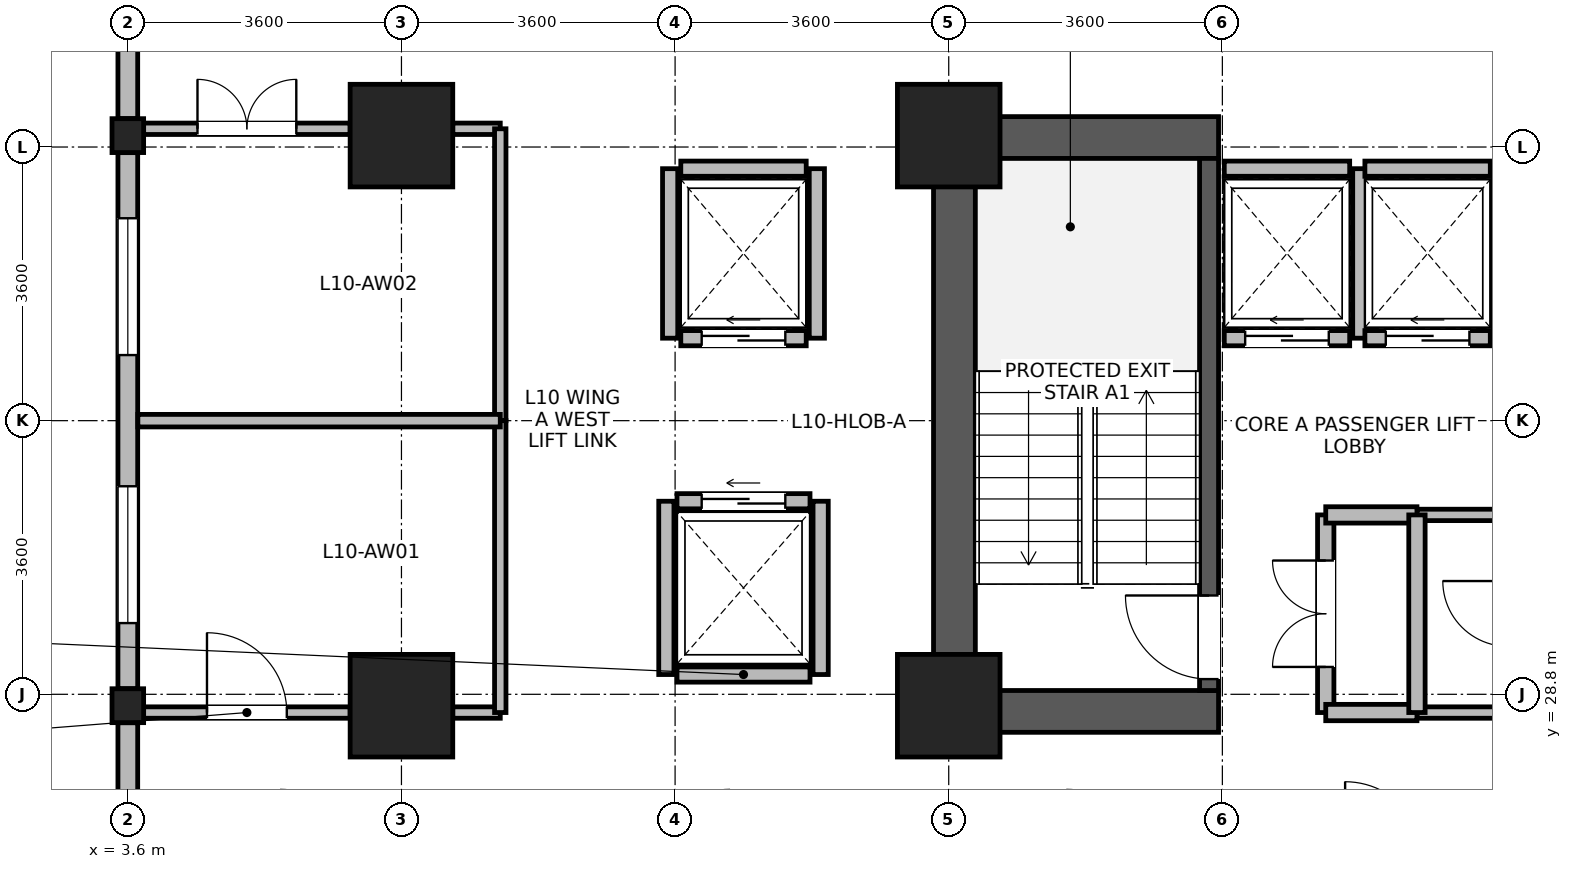
"""IFC4 building model, lengths in metres.
Left out: names, types, materials, properties, quantities, classifications, styles, units other than length and angle.
Written with IfcOpenShell. Run it as: python <this file> out.ifc"""

import sys

from ifc_helpers import new_model, si_unit, direction, frame, frame_2d, origin, origin_2d, place, context, subcontext, project, spatial, rectangle, i_section, extrude, source, transform, mapped, element, fill, save


model = new_model("IFC4")
c1 = context("Model", 3, precision=1e-05, world=origin(), true_north=direction((0.0, 1.0)))
c2 = subcontext(c1, "Body", "Model", "MODEL_VIEW")
j1 = project(units=[si_unit("LENGTHUNIT", "METRE"), si_unit("PLANEANGLEUNIT", "RADIAN")], contexts=[c1])
p1 = place(None, origin())
s1 = spatial("IfcSite", under=j1, at=p1, CompositionType="ELEMENT")
p2 = place(p1, origin())
s2 = spatial("IfcBuilding", under=s1, at=p2, CompositionType="ELEMENT")
p3 = place(p2, frame((0.0, 0.0, 43.8)))
s3 = spatial("IfcBuildingStorey", under=s2, at=p3, CompositionType="ELEMENT", Elevation=43.8)
p4 = place(p3, frame((14.475, 28.3, 0.0), z_axis=(0.0, 0.0, 1.0), x_axis=(0.0, 1.0, 0.0)))
e1 = element("IfcWall", 1, at=p4, inside=s3, PredefinedType="SHEAR", context=c2, shape_type="SweptSolid", body=[
    extrude(rectangle(XDim=8.1, YDim=0.55, at=frame_2d((4.05, 0.0))), origin(), (0.0, 0.0, 1.0), 3.45),
])
for number, where, z_axis, x_axis in (
    (2, (14.75, 28.575, 0.0), (0.0, 0.0, 1.0), (1.0, 0.0, 0.0)),
    (3, (14.75, 36.125, 0.0), (0.0, 0.0, 1.0), (1.0, 0.0, 0.0)),
):
    element("IfcWall", number, at=place(p3, frame(where, z_axis=z_axis, x_axis=x_axis)), inside=s3, PredefinedType="SHEAR", context=c2, shape_type="SweptSolid", body=[
        extrude(rectangle(XDim=3.2, YDim=0.55, at=frame_2d((1.6, 0.0))), origin(), (0.0, 0.0, 1.0), 3.45),
    ])
p5 = place(p3, frame((17.825, 28.85, 0.0), z_axis=(0.0, 0.0, 1.0), x_axis=(0.0, 1.0, 0.0)))
e4 = element("IfcWall", 4, at=p5, inside=s3, PredefinedType="SHEAR", context=c2, shape_type="SweptSolid", body=[
    extrude(rectangle(XDim=7.0, YDim=0.25, at=frame_2d((3.5, 0.0))), origin(), (0.0, 0.0, 1.0), 3.45),
])
p6 = place(p5, frame((0.15, 0.0, 0.0)))
e5 = element("IfcOpeningElement", 5, at=p6, cuts=e4, PredefinedType="OPENING", context=c2, shape_type="SweptSolid", body=[
    extrude(rectangle(XDim=1.1, YDim=2.08, at=frame_2d((0.55, 1.04))), frame((0.0, 0.135, 0.0), z_axis=(0.0, -1.0, 0.0), x_axis=(1.0, 0.0, 0.0)), (0.0, 0.0, 1.0), 0.27),
])
m1 = source(origin(), c2, "Body", "SweptSolid", [
    extrude(rectangle(XDim=1.35, YDim=1.35, at=origin_2d()), origin(), (0.0, 0.0, 1.0), 3.7),
])
for number, where, z_axis, x_axis in (
    (6, (7.2, 28.65, 0.0), (0.0, 0.0, 1.0), (1.0, 0.0, 0.0)),
    (7, (7.2, 36.15, 0.0), (0.0, 0.0, 1.0), (1.0, 0.0, 0.0)),
    (8, (14.4, 28.65, 0.0), (0.0, 0.0, 1.0), (1.0, 0.0, 0.0)),
    (9, (14.4, 36.15, 0.0), (0.0, 0.0, 1.0), (1.0, 0.0, 0.0)),
):
    element("IfcColumn", number, at=place(p3, frame(where, z_axis=z_axis, x_axis=x_axis)), inside=s3, PredefinedType="COLUMN", context=c2, shape_type="MappedRepresentation", body=[
        mapped(m1, transform((0.0, 0.0, 0.0), x_axis=(1.0, 0.0, 0.0), y_axis=(0.0, 1.0, 0.0), z_axis=(0.0, 0.0, 1.0), scale=1.0)),
    ])
m2 = source(origin(), c2, "Body", "SweptSolid", [
    extrude(i_section(OverallWidth=0.416, OverallDepth=0.446, WebThickness=0.029, FlangeThickness=0.04, FilletRadius=0.015, at=origin_2d()), origin(), (0.0, 0.0, 1.0), 3.7),
])
for number, where, z_axis, x_axis in (
    (10, (3.6, 28.65, 0.0), (0.0, 0.0, 1.0), (1.0, 0.0, 0.0)),
    (11, (3.6, 36.15, 0.0), (0.0, 0.0, 1.0), (1.0, 0.0, 0.0)),
):
    element("IfcColumn", number, at=place(p3, frame(where, z_axis=z_axis, x_axis=x_axis)), inside=s3, PredefinedType="COLUMN", context=c2, shape_type="MappedRepresentation", body=[
        mapped(m2, transform((0.0, 0.0, 0.0), x_axis=(1.0, 0.0, 0.0), y_axis=(0.0, 1.0, 0.0), z_axis=(0.0, 0.0, 1.0), scale=1.0)),
    ])
p7 = place(p3, frame((3.6, 36.374, 0.0), z_axis=(0.0, 0.0, 1.0), x_axis=(0.0, 1.0, 0.0)))
e12 = element("IfcWall", 12, at=p7, inside=s3, PredefinedType="STANDARD", context=c2, shape_type="SweptSolid", body=[
    extrude(rectangle(XDim=6.956, YDim=0.26, at=frame_2d((3.478, 0.0))), origin(), (0.0, 0.0, 1.0), 3.43),
])
p8 = place(p7, frame((4.317, 0.0, 0.85)))
e13 = element("IfcOpeningElement", 13, at=p8, cuts=e12, PredefinedType="OPENING", context=c2, shape_type="SweptSolid", body=[
    extrude(rectangle(XDim=1.8, YDim=1.85, at=frame_2d((0.9, 0.925))), frame((0.0, 0.14, 0.0), z_axis=(0.0, -1.0, 0.0), x_axis=(1.0, 0.0, 0.0)), (0.0, 0.0, 1.0), 0.28),
])
p9 = place(p7, frame((3.003, 0.0, 0.85)))
e14 = element("IfcOpeningElement", 14, at=p9, cuts=e12, PredefinedType="OPENING", context=c2, shape_type="SweptSolid", body=[
    extrude(rectangle(XDim=0.95, YDim=1.75, at=frame_2d((0.475, 0.875))), frame((0.0, 0.14, 0.0), z_axis=(0.0, -1.0, 0.0), x_axis=(1.0, 0.0, 0.0)), (0.0, 0.0, 1.0), 0.28),
])
p10 = place(p3, frame((3.6, 28.874, 0.0), z_axis=(0.0, 0.0, 1.0), x_axis=(0.0, 1.0, 0.0)))
e15 = element("IfcWall", 15, at=p10, inside=s3, PredefinedType="STANDARD", context=c2, shape_type="SweptSolid", body=[
    extrude(rectangle(XDim=7.052, YDim=0.26, at=frame_2d((3.526, 0.0))), origin(), (0.0, 0.0, 1.0), 2.93),
])
p11 = place(p10, frame((0.863, 0.0, 0.85)))
e16 = element("IfcOpeningElement", 16, at=p11, cuts=e15, PredefinedType="OPENING", context=c2, shape_type="SweptSolid", body=[
    extrude(rectangle(XDim=1.8, YDim=1.85, at=frame_2d((0.9, 0.925))), frame((0.0, 0.14, 0.0), z_axis=(0.0, -1.0, 0.0), x_axis=(1.0, 0.0, 0.0)), (0.0, 0.0, 1.0), 0.28),
])
p12 = place(p10, frame((4.389, 0.0, 0.85)))
e17 = element("IfcOpeningElement", 17, at=p12, cuts=e15, PredefinedType="OPENING", context=c2, shape_type="SweptSolid", body=[
    extrude(rectangle(XDim=1.8, YDim=1.85, at=frame_2d((0.9, 0.925))), frame((0.0, 0.14, 0.0), z_axis=(0.0, -1.0, 0.0), x_axis=(1.0, 0.0, 0.0)), (0.0, 0.0, 1.0), 0.28),
])
p13 = place(p3, frame((3.6, 21.47, 0.0), z_axis=(0.0, 0.0, 1.0), x_axis=(0.0, 1.0, 0.0)))
e18 = element("IfcWall", 18, at=p13, inside=s3, PredefinedType="STANDARD", context=c2, shape_type="SweptSolid", body=[
    extrude(rectangle(XDim=6.956, YDim=0.26, at=frame_2d((3.478, 0.0))), origin(), (0.0, 0.0, 1.0), 3.43),
])
p14 = place(p13, frame((0.839, 0.0, 0.85)))
e19 = element("IfcOpeningElement", 19, at=p14, cuts=e18, PredefinedType="OPENING", context=c2, shape_type="SweptSolid", body=[
    extrude(rectangle(XDim=1.8, YDim=1.85, at=frame_2d((0.9, 0.925))), frame((0.0, 0.14, 0.0), z_axis=(0.0, -1.0, 0.0), x_axis=(1.0, 0.0, 0.0)), (0.0, 0.0, 1.0), 0.28),
])
p15 = place(p13, frame((3.003, 0.0, 0.85)))
e20 = element("IfcOpeningElement", 20, at=p15, cuts=e18, PredefinedType="OPENING", context=c2, shape_type="SweptSolid", body=[
    extrude(rectangle(XDim=0.95, YDim=1.75, at=frame_2d((0.475, 0.875))), frame((0.0, 0.14, 0.0), z_axis=(0.0, -1.0, 0.0), x_axis=(1.0, 0.0, 0.0)), (0.0, 0.0, 1.0), 0.28),
])
p16 = place(p3, frame((18.025, 33.485, 0.0), z_axis=(0.0, 0.0, 1.0), x_axis=(1.0, 0.0, 0.0)))
e21 = element("IfcWall", 21, at=p16, inside=s3, PredefinedType="PARTITIONING", context=c2, shape_type="SweptSolid", body=[
    extrude(rectangle(XDim=1.65, YDim=0.2, at=frame_2d((0.825, 0.0))), origin(), (0.0, 0.0, 1.0), 3.43),
])
p17 = place(p16, frame((0.275, 0.0, 0.0)))
e22 = element("IfcOpeningElement", 22, at=p17, cuts=e21, PredefinedType="OPENING", context=c2, shape_type="SweptSolid", body=[
    extrude(rectangle(XDim=1.1, YDim=2.12, at=frame_2d((0.55, 1.06))), frame((0.0, 0.11, 0.0), z_axis=(0.0, -1.0, 0.0), x_axis=(1.0, 0.0, 0.0)), (0.0, 0.0, 1.0), 0.22),
])
p18 = place(p3, frame((18.025, 35.715, 0.0), z_axis=(0.0, 0.0, 1.0), x_axis=(1.0, 0.0, 0.0)))
e23 = element("IfcWall", 23, at=p18, inside=s3, PredefinedType="PARTITIONING", context=c2, shape_type="SweptSolid", body=[
    extrude(rectangle(XDim=1.65, YDim=0.2, at=frame_2d((0.825, 0.0))), origin(), (0.0, 0.0, 1.0), 2.23),
])
p19 = place(p3, frame((19.815, 33.485, 0.0), z_axis=(0.0, 0.0, 1.0), x_axis=(0.0, 1.0, 0.0)))
e24 = element("IfcWall", 24, at=p19, inside=s3, PredefinedType="PARTITIONING", context=c2, shape_type="SweptSolid", body=[
    extrude(rectangle(XDim=2.23, YDim=0.2, at=frame_2d((1.115, 0.0))), origin(), (0.0, 0.0, 1.0), 3.43),
])
p20 = place(p3, frame((19.875, 33.485, 0.0), z_axis=(0.0, 0.0, 1.0), x_axis=(1.0, 0.0, 0.0)))
e25 = element("IfcWall", 25, at=p20, inside=s3, PredefinedType="PARTITIONING", context=c2, shape_type="SweptSolid", body=[
    extrude(rectangle(XDim=1.65, YDim=0.2, at=frame_2d((0.825, 0.0))), origin(), (0.0, 0.0, 1.0), 3.43),
])
p21 = place(p20, frame((0.275, 0.0, 0.0)))
e26 = element("IfcOpeningElement", 26, at=p21, cuts=e25, PredefinedType="OPENING", context=c2, shape_type="SweptSolid", body=[
    extrude(rectangle(XDim=1.1, YDim=2.12, at=frame_2d((0.55, 1.06))), frame((0.0, 0.11, 0.0), z_axis=(0.0, -1.0, 0.0), x_axis=(1.0, 0.0, 0.0)), (0.0, 0.0, 1.0), 0.22),
])
p22 = place(p3, frame((19.875, 35.715, 0.0), z_axis=(0.0, 0.0, 1.0), x_axis=(1.0, 0.0, 0.0)))
e27 = element("IfcWall", 27, at=p22, inside=s3, PredefinedType="PARTITIONING", context=c2, shape_type="SweptSolid", body=[
    extrude(rectangle(XDim=1.65, YDim=0.2, at=frame_2d((0.825, 0.0))), origin(), (0.0, 0.0, 1.0), 2.23),
])
p23 = place(p3, frame((10.825, 29.06, 0.0), z_axis=(0.0, 0.0, 1.0), x_axis=(1.0, 0.0, 0.0)))
e28 = element("IfcWall", 28, at=p23, inside=s3, PredefinedType="PARTITIONING", context=c2, shape_type="SweptSolid", body=[
    extrude(rectangle(XDim=1.75, YDim=0.2, at=frame_2d((0.875, 0.0))), origin(), (0.0, 0.0, 1.0), 3.43),
])
p24 = place(p3, frame((10.825, 31.34, 0.0), z_axis=(0.0, 0.0, 1.0), x_axis=(1.0, 0.0, 0.0)))
e29 = element("IfcWall", 29, at=p24, inside=s3, PredefinedType="PARTITIONING", context=c2, shape_type="SweptSolid", body=[
    extrude(rectangle(XDim=1.75, YDim=0.2, at=frame_2d((0.875, 0.0))), origin(), (0.0, 0.0, 1.0), 3.43),
])
p25 = place(p24, frame((0.325, 0.0, 0.0)))
e30 = element("IfcOpeningElement", 30, at=p25, cuts=e29, PredefinedType="OPENING", context=c2, shape_type="SweptSolid", body=[
    extrude(rectangle(XDim=1.1, YDim=2.12, at=frame_2d((0.55, 1.06))), frame((0.0, 0.11, 0.0), z_axis=(0.0, -1.0, 0.0), x_axis=(1.0, 0.0, 0.0)), (0.0, 0.0, 1.0), 0.22),
])
for number, where, z_axis, x_axis in (
    (31, (10.685, 29.06, 0.0), (0.0, 0.0, 1.0), (0.0, 1.0, 0.0)),
    (32, (12.715, 29.06, 0.0), (0.0, 0.0, 1.0), (0.0, 1.0, 0.0)),
):
    element("IfcWall", number, at=place(p3, frame(where, z_axis=z_axis, x_axis=x_axis)), inside=s3, PredefinedType="PARTITIONING", context=c2, shape_type="SweptSolid", body=[
        extrude(rectangle(XDim=2.28, YDim=0.2, at=frame_2d((1.14, 0.0))), origin(), (0.0, 0.0, 1.0), 3.43),
    ])
p26 = place(p3, frame((10.875, 33.485, 0.0), z_axis=(0.0, 0.0, 1.0), x_axis=(1.0, 0.0, 0.0)))
e33 = element("IfcWall", 33, at=p26, inside=s3, PredefinedType="PARTITIONING", context=c2, shape_type="SweptSolid", body=[
    extrude(rectangle(XDim=1.65, YDim=0.2, at=frame_2d((0.825, 0.0))), origin(), (0.0, 0.0, 1.0), 3.43),
])
p27 = place(p26, frame((0.275, 0.0, 0.0)))
e34 = element("IfcOpeningElement", 34, at=p27, cuts=e33, PredefinedType="OPENING", context=c2, shape_type="SweptSolid", body=[
    extrude(rectangle(XDim=1.1, YDim=2.12, at=frame_2d((0.55, 1.06))), frame((0.0, 0.11, 0.0), z_axis=(0.0, -1.0, 0.0), x_axis=(1.0, 0.0, 0.0)), (0.0, 0.0, 1.0), 0.22),
])
p28 = place(p3, frame((10.875, 35.715, 0.0), z_axis=(0.0, 0.0, 1.0), x_axis=(1.0, 0.0, 0.0)))
e35 = element("IfcWall", 35, at=p28, inside=s3, PredefinedType="PARTITIONING", context=c2, shape_type="SweptSolid", body=[
    extrude(rectangle(XDim=1.65, YDim=0.2, at=frame_2d((0.825, 0.0))), origin(), (0.0, 0.0, 1.0), 3.43),
])
for number, where, z_axis, x_axis in (
    (36, (10.735, 33.485, 0.0), (0.0, 0.0, 1.0), (0.0, 1.0, 0.0)),
    (37, (12.665, 33.485, 0.0), (0.0, 0.0, 1.0), (0.0, 1.0, 0.0)),
):
    element("IfcWall", number, at=place(p3, frame(where, z_axis=z_axis, x_axis=x_axis)), inside=s3, PredefinedType="PARTITIONING", context=c2, shape_type="SweptSolid", body=[
        extrude(rectangle(XDim=2.23, YDim=0.2, at=frame_2d((1.115, 0.0))), origin(), (0.0, 0.0, 1.0), 3.43),
    ])
p29 = place(p3, frame((3.808, 28.56, 0.0), z_axis=(0.0, 0.0, 1.0), x_axis=(1.0, 0.0, 0.0)))
e38 = element("IfcWall", 38, at=p29, inside=s3, PredefinedType="PARTITIONING", context=c2, shape_type="SweptSolid", body=[
    extrude(rectangle(XDim=2.717, YDim=0.15, at=frame_2d((1.358, 0.0))), origin(), (0.0, 0.0, 1.0), 2.78),
])
p30 = place(p29, frame((0.833, 0.0, 0.0)))
e39 = element("IfcOpeningElement", 39, at=p30, cuts=e38, PredefinedType="OPENING", context=c2, shape_type="SweptSolid", body=[
    extrude(rectangle(XDim=1.05, YDim=2.12, at=frame_2d((0.525, 1.06))), frame((0.0, 0.085, 0.0), z_axis=(0.0, -1.0, 0.0), x_axis=(1.0, 0.0, 0.0)), (0.0, 0.0, 1.0), 0.17),
])
p31 = place(p3, frame((7.875, 28.56, 0.0), z_axis=(0.0, 0.0, 1.0), x_axis=(1.0, 0.0, 0.0)))
e40 = element("IfcWall", 40, at=p31, inside=s3, PredefinedType="PARTITIONING", context=c2, shape_type="SweptSolid", body=[
    extrude(rectangle(XDim=0.625, YDim=0.15, at=frame_2d((0.312, 0.0))), origin(), (0.0, 0.0, 1.0), 2.78),
])
p32 = place(p3, frame((3.808, 36.24, 0.0), z_axis=(0.0, 0.0, 1.0), x_axis=(1.0, 0.0, 0.0)))
e41 = element("IfcWall", 41, at=p32, inside=s3, PredefinedType="PARTITIONING", context=c2, shape_type="SweptSolid", body=[
    extrude(rectangle(XDim=2.717, YDim=0.15, at=frame_2d((1.358, 0.0))), origin(), (0.0, 0.0, 1.0), 2.78),
])
p33 = place(p32, frame((0.708, 0.0, 0.0)))
e42 = element("IfcOpeningElement", 42, at=p33, cuts=e41, PredefinedType="OPENING", context=c2, shape_type="SweptSolid", body=[
    extrude(rectangle(XDim=1.3, YDim=2.12, at=frame_2d((0.65, 1.06))), frame((0.0, 0.085, 0.0), z_axis=(0.0, -1.0, 0.0), x_axis=(1.0, 0.0, 0.0)), (0.0, 0.0, 1.0), 0.17),
])
p34 = place(p3, frame((7.875, 36.24, 0.0), z_axis=(0.0, 0.0, 1.0), x_axis=(1.0, 0.0, 0.0)))
e43 = element("IfcWall", 43, at=p34, inside=s3, PredefinedType="PARTITIONING", context=c2, shape_type="SweptSolid", body=[
    extrude(rectangle(XDim=0.625, YDim=0.15, at=frame_2d((0.312, 0.0))), origin(), (0.0, 0.0, 1.0), 2.78),
])
p35 = place(p3, frame((8.5, 32.4, 0.0), z_axis=(0.0, 0.0, 1.0), x_axis=(0.0, 1.0, 0.0)))
e44 = element("IfcWall", 44, at=p35, inside=s3, PredefinedType="PARTITIONING", context=c2, shape_type="SweptSolid", body=[
    extrude(rectangle(XDim=3.84, YDim=0.15, at=frame_2d((1.92, 0.0))), origin(), (0.0, 0.0, 1.0), 3.43),
])
p36 = place(p3, frame((8.5, 28.56, 0.0), z_axis=(0.0, 0.0, 1.0), x_axis=(0.0, 1.0, 0.0)))
e45 = element("IfcWall", 45, at=p36, inside=s3, PredefinedType="PARTITIONING", context=c2, shape_type="SweptSolid", body=[
    extrude(rectangle(XDim=3.84, YDim=0.15, at=frame_2d((1.92, 0.0))), origin(), (0.0, 0.0, 1.0), 3.43),
])
p37 = place(p3, frame((19.36, 28.56, 0.0), z_axis=(0.0, 0.0, 1.0), x_axis=(0.0, 1.0, 0.0)))
e46 = element("IfcWall", 46, at=p37, inside=s3, PredefinedType="PARTITIONING", context=c2, shape_type="SweptSolid", body=[
    extrude(rectangle(XDim=2.6, YDim=0.215, at=frame_2d((1.3, 0.0))), origin(), (0.0, 0.0, 1.0), 3.43),
])
p38 = place(p37, frame((0.6, 0.0, 0.0)))
e47 = element("IfcOpeningElement", 47, at=p38, cuts=e46, PredefinedType="OPENING", context=c2, shape_type="SweptSolid", body=[
    extrude(rectangle(XDim=1.4, YDim=2.15, at=frame_2d((0.7, 1.075))), frame((0.0, 0.118, 0.0), z_axis=(0.0, -1.0, 0.0), x_axis=(1.0, 0.0, 0.0)), (0.0, 0.0, 1.0), 0.235),
])
p39 = place(p3, frame((20.56, 28.56, 0.0), z_axis=(0.0, 0.0, 1.0), x_axis=(1.0, 0.0, 0.0)))
e48 = element("IfcWall", 48, at=p39, inside=s3, PredefinedType="PARTITIONING", context=c2, shape_type="SweptSolid", body=[
    extrude(rectangle(XDim=1.2, YDim=0.15, at=frame_2d((0.6, 0.0))), origin(), (0.0, 0.0, 1.0), 2.23),
])
p40 = place(p3, frame((20.56, 31.16, 0.0), z_axis=(0.0, 0.0, 1.0), x_axis=(1.0, 0.0, 0.0)))
e49 = element("IfcWall", 49, at=p40, inside=s3, PredefinedType="PARTITIONING", context=c2, shape_type="SweptSolid", body=[
    extrude(rectangle(XDim=1.2, YDim=0.15, at=frame_2d((0.6, 0.0))), origin(), (0.0, 0.0, 1.0), 3.43),
])
p41 = place(p3, frame((19.36, 28.56, 0.0), z_axis=(0.0, 0.0, 1.0), x_axis=(1.0, 0.0, 0.0)))
e50 = element("IfcWall", 50, at=p41, inside=s3, PredefinedType="PARTITIONING", context=c2, shape_type="SweptSolid", body=[
    extrude(rectangle(XDim=1.2, YDim=0.215, at=frame_2d((0.6, 0.0))), origin(), (0.0, 0.0, 1.0), 2.23),
])
p42 = place(p3, frame((19.36, 31.16, 0.0), z_axis=(0.0, 0.0, 1.0), x_axis=(1.0, 0.0, 0.0)))
e51 = element("IfcWall", 51, at=p42, inside=s3, PredefinedType="PARTITIONING", context=c2, shape_type="SweptSolid", body=[
    extrude(rectangle(XDim=1.2, YDim=0.215, at=frame_2d((0.6, 0.0))), origin(), (0.0, 0.0, 1.0), 3.43),
])
p43 = place(p3, frame((3.732, 32.4, 0.0), z_axis=(0.0, 0.0, 1.0), x_axis=(1.0, 0.0, 0.0)))
e52 = element("IfcWall", 52, at=p43, inside=s3, PredefinedType="PARTITIONING", context=c2, shape_type="SweptSolid", body=[
    extrude(rectangle(XDim=4.768, YDim=0.165, at=frame_2d((2.384, 0.0))), origin(), (0.0, 0.0, 1.0), 3.43),
])
p44 = place(p3, frame((20.56, 28.56, 0.0), z_axis=(0.0, 0.0, 1.0), x_axis=(0.0, 1.0, 0.0)))
e53 = element("IfcWall", 53, at=p44, inside=s3, PredefinedType="PARTITIONING", context=c2, shape_type="SweptSolid", body=[
    extrude(rectangle(XDim=2.6, YDim=0.215, at=frame_2d((1.3, 0.0))), origin(), (0.0, 0.0, 1.0), 3.43),
])
p45 = place(p11, origin())
e54 = element("IfcWindow", 54, at=p45, inside=s3, PartitioningType="SINGLE_PANEL", PredefinedType="WINDOW", context=c2, shape_type="SweptSolid", body=[
    extrude(rectangle(XDim=1.8, YDim=1.85, at=frame_2d((0.9, 0.925))), frame((0.0, 0.03, 0.0), z_axis=(0.0, -1.0, 0.0), x_axis=(1.0, 0.0, 0.0)), (0.0, 0.0, 1.0), 0.06),
])
fill(e16, e54)
p46 = place(p12, origin())
e55 = element("IfcWindow", 55, at=p46, inside=s3, PartitioningType="SINGLE_PANEL", PredefinedType="WINDOW", context=c2, shape_type="SweptSolid", body=[
    extrude(rectangle(XDim=1.8, YDim=1.85, at=frame_2d((0.9, 0.925))), frame((0.0, 0.03, 0.0), z_axis=(0.0, -1.0, 0.0), x_axis=(1.0, 0.0, 0.0)), (0.0, 0.0, 1.0), 0.06),
])
fill(e17, e55)
p47 = place(p6, origin())
e56 = element("IfcDoor", 56, at=p47, inside=s3, OperationType="SINGLE_SWING_RIGHT", PredefinedType="DOOR", context=c2, shape_type="SweptSolid", body=[
    extrude(rectangle(XDim=1.1, YDim=2.08, at=frame_2d((0.55, 1.04))), frame((0.0, 0.025, 0.0), z_axis=(0.0, -1.0, 0.0), x_axis=(1.0, 0.0, 0.0)), (0.0, 0.0, 1.0), 0.05),
])
fill(e5, e56)
p48 = place(p17, origin())
e57 = element("IfcDoor", 57, at=p48, inside=s3, OperationType="SLIDING_TO_LEFT", PredefinedType="DOOR", context=c2, shape_type="SweptSolid", body=[
    extrude(rectangle(XDim=1.1, YDim=2.12, at=frame_2d((0.55, 1.06))), frame((0.0, 0.025, 0.0), z_axis=(0.0, -1.0, 0.0), x_axis=(1.0, 0.0, 0.0)), (0.0, 0.0, 1.0), 0.05),
])
fill(e22, e57)
p49 = place(p21, origin())
e58 = element("IfcDoor", 58, at=p49, inside=s3, OperationType="SLIDING_TO_LEFT", PredefinedType="DOOR", context=c2, shape_type="SweptSolid", body=[
    extrude(rectangle(XDim=1.1, YDim=2.12, at=frame_2d((0.55, 1.06))), frame((0.0, 0.025, 0.0), z_axis=(0.0, -1.0, 0.0), x_axis=(1.0, 0.0, 0.0)), (0.0, 0.0, 1.0), 0.05),
])
fill(e26, e58)
p50 = place(p25, origin())
e59 = element("IfcDoor", 59, at=p50, inside=s3, OperationType="SLIDING_TO_LEFT", PredefinedType="DOOR", context=c2, shape_type="SweptSolid", body=[
    extrude(rectangle(XDim=1.1, YDim=2.12, at=frame_2d((0.55, 1.06))), frame((0.0, 0.025, 0.0), z_axis=(0.0, -1.0, 0.0), x_axis=(1.0, 0.0, 0.0)), (0.0, 0.0, 1.0), 0.05),
])
fill(e30, e59)
p51 = place(p27, origin())
e60 = element("IfcDoor", 60, at=p51, inside=s3, OperationType="SLIDING_TO_LEFT", PredefinedType="DOOR", context=c2, shape_type="SweptSolid", body=[
    extrude(rectangle(XDim=1.1, YDim=2.12, at=frame_2d((0.55, 1.06))), frame((0.0, 0.025, 0.0), z_axis=(0.0, -1.0, 0.0), x_axis=(1.0, 0.0, 0.0)), (0.0, 0.0, 1.0), 0.05),
])
fill(e34, e60)
p52 = place(p30, origin())
e61 = element("IfcDoor", 61, at=p52, inside=s3, OperationType="SINGLE_SWING_LEFT", PredefinedType="DOOR", context=c2, shape_type="SweptSolid", body=[
    extrude(rectangle(XDim=1.05, YDim=2.12, at=frame_2d((0.525, 1.06))), frame((0.0, 0.025, 0.0), z_axis=(0.0, -1.0, 0.0), x_axis=(1.0, 0.0, 0.0)), (0.0, 0.0, 1.0), 0.05),
])
fill(e39, e61)
p53 = place(p33, origin())
e62 = element("IfcDoor", 62, at=p53, inside=s3, OperationType="DOUBLE_DOOR_SINGLE_SWING", PredefinedType="DOOR", context=c2, shape_type="SweptSolid", body=[
    extrude(rectangle(XDim=1.3, YDim=2.12, at=frame_2d((0.65, 1.06))), frame((0.0, 0.025, 0.0), z_axis=(0.0, -1.0, 0.0), x_axis=(1.0, 0.0, 0.0)), (0.0, 0.0, 1.0), 0.05),
])
fill(e42, e62)
p54 = place(p38, origin())
e63 = element("IfcDoor", 63, at=p54, inside=s3, OperationType="DOUBLE_DOOR_SINGLE_SWING", PredefinedType="DOOR", context=c2, shape_type="SweptSolid", body=[
    extrude(rectangle(XDim=1.4, YDim=2.15, at=frame_2d((0.7, 1.075))), frame((0.0, 0.025, 0.0), z_axis=(0.0, -1.0, 0.0), x_axis=(1.0, 0.0, 0.0)), (0.0, 0.0, 1.0), 0.05),
])
fill(e47, e63)
save(model, sys.argv[1])
